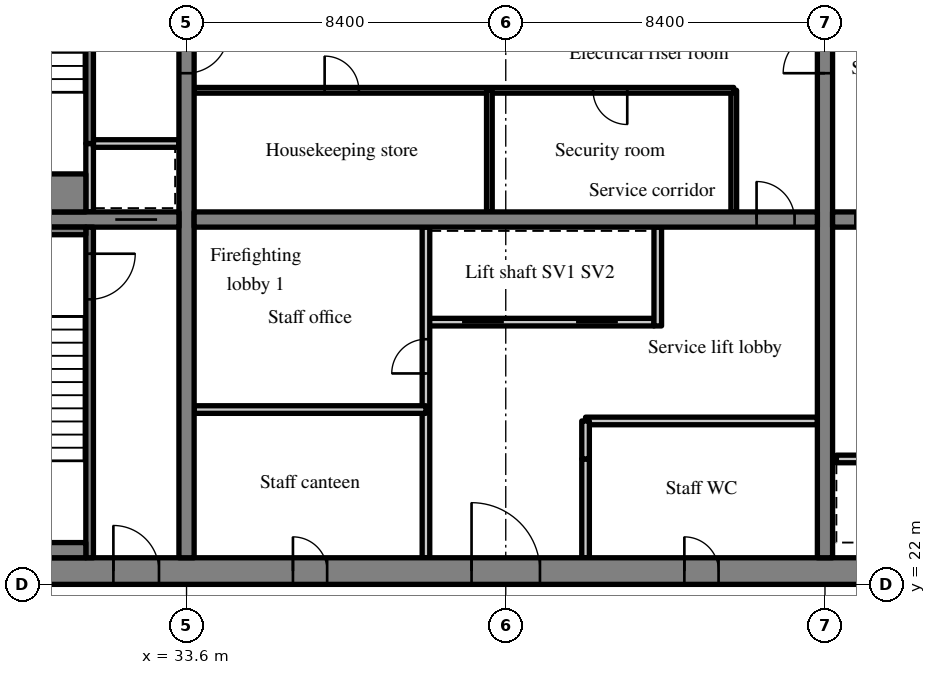
"""IFC4 building model, lengths in metres.
Left out: names, types, materials, properties, quantities, classifications, styles, units other than length and angle.
Written with IfcOpenShell. Run it as: python <this file> out.ifc"""

import sys

from ifc_helpers import new_model, si_unit, direction, frame, frame_2d, origin, place, context, subcontext, project, spatial, rectangle, extrude, source, transform, mapped, element, fill, save


model = new_model("IFC4")
c1 = context("Model", 3, precision=1e-05, world=origin(), true_north=direction((0.0, 1.0)))
c2 = subcontext(c1, "Body", "Model", "MODEL_VIEW")
j1 = project(units=[si_unit("LENGTHUNIT", "METRE"), si_unit("PLANEANGLEUNIT", "RADIAN")], contexts=[c1])
p1 = place(None, origin())
s1 = spatial("IfcSite", under=j1, at=p1, CompositionType="ELEMENT")
p2 = place(p1, origin())
s2 = spatial("IfcBuilding", under=s1, at=p2, CompositionType="ELEMENT")
p3 = place(p2, frame((0.0, 0.0, 174.4)))
s3 = spatial("IfcBuildingStorey", under=s2, at=p3, CompositionType="ELEMENT", Elevation=174.4)
m1 = source(origin(), c2, "Body", "SweptSolid", [
    extrude(rectangle(XDim=50.4, YDim=0.7, at=frame_2d((25.2, 0.0))), origin(), (0.0, 0.0, 1.0), 3.52),
])
p4 = place(p3, frame((25.2, 22.35, 0.0), z_axis=(0.0, 0.0, 1.0), x_axis=(1.0, 0.0, 0.0)))
e1 = element("IfcWall", 1, at=p4, inside=s3, PredefinedType="SHEAR", context=c2, shape_type="MappedRepresentation", body=[
    mapped(m1, transform((0.0, 0.0, 0.0), scale=1.0)),
])
m2 = source(origin(), c2, "Body", "SweptSolid", [
    extrude(rectangle(XDim=1.8, YDim=2.1, at=frame_2d((0.9, 1.05))), frame((0.0, 0.36, 0.0), z_axis=(0.0, -1.0, 0.0), x_axis=(1.0, 0.0, 0.0)), (0.0, 0.0, 1.0), 0.72),
])
p5 = place(p4, frame((15.9, 0.0, 0.0)))
e2 = element("IfcOpeningElement", 2, at=p5, cuts=e1, PredefinedType="OPENING", context=c2, shape_type="MappedRepresentation", body=[
    mapped(m2, transform((0.0, 0.0, 0.0), scale=1.0)),
])
m3 = source(origin(), c2, "Body", "SweptSolid", [
    extrude(rectangle(XDim=0.9, YDim=2.1, at=frame_2d((0.45, 1.05))), frame((0.0, 0.36, 0.0), z_axis=(0.0, -1.0, 0.0), x_axis=(1.0, 0.0, 0.0)), (0.0, 0.0, 1.0), 0.72),
])
p6 = place(p4, frame((11.2, 0.0, 0.0)))
e3 = element("IfcOpeningElement", 3, at=p6, cuts=e1, PredefinedType="OPENING", context=c2, shape_type="MappedRepresentation", body=[
    mapped(m3, transform((0.0, 0.0, 0.0), scale=1.0)),
])
p7 = place(p4, frame((21.5, 0.0, 0.0)))
e4 = element("IfcOpeningElement", 4, at=p7, cuts=e1, PredefinedType="OPENING", context=c2, shape_type="MappedRepresentation", body=[
    mapped(m3, transform((0.0, 0.0, 0.0), scale=1.0)),
])
p8 = place(p4, frame((32.7, 0.0, 0.0)))
e5 = element("IfcOpeningElement", 5, at=p8, cuts=e1, PredefinedType="OPENING", context=c2, shape_type="MappedRepresentation", body=[
    mapped(m2, transform((0.0, 0.0, 0.0), scale=1.0)),
])
m4 = source(origin(), c2, "Body", "SweptSolid", [
    extrude(rectangle(XDim=1.2, YDim=2.1, at=frame_2d((0.6, 1.05))), frame((0.0, 0.36, 0.0), z_axis=(0.0, -1.0, 0.0), x_axis=(1.0, 0.0, 0.0)), (0.0, 0.0, 1.0), 0.72),
])
p9 = place(p4, frame((6.475, 0.0, 0.0)))
e6 = element("IfcOpeningElement", 6, at=p9, cuts=e1, PredefinedType="OPENING", context=c2, shape_type="MappedRepresentation", body=[
    mapped(m4, transform((0.0, 0.0, 0.0), scale=1.0)),
])
p10 = place(p4, frame((47.875, 0.0, 0.0)))
e7 = element("IfcOpeningElement", 7, at=p10, cuts=e1, PredefinedType="OPENING", context=c2, shape_type="MappedRepresentation", body=[
    mapped(m4, transform((0.0, 0.0, 0.0), scale=1.0)),
])
m5 = source(origin(), c2, "Body", "SweptSolid", [
    extrude(rectangle(XDim=18.6, YDim=0.4, at=frame_2d((9.3, 0.0))), origin(), (0.0, 0.0, 1.0), 3.52),
])
p11 = place(p3, frame((33.6, 22.7, 0.0), z_axis=(0.0, 0.0, 1.0), x_axis=(0.0, 1.0, 0.0)))
e8 = element("IfcWall", 8, at=p11, inside=s3, PredefinedType="SHEAR", context=c2, shape_type="MappedRepresentation", body=[
    mapped(m5, transform((0.0, 0.0, 0.0), scale=1.0)),
])
m6 = source(origin(), c2, "Body", "SweptSolid", [
    extrude(rectangle(XDim=1.1, YDim=2.1, at=frame_2d((0.55, 1.05))), frame((0.0, 0.21, 0.0), z_axis=(0.0, -1.0, 0.0), x_axis=(1.0, 0.0, 0.0)), (0.0, 0.0, 1.0), 0.42),
])
p12 = place(p11, frame((12.75, 0.0, 0.0)))
e9 = element("IfcOpeningElement", 9, at=p12, cuts=e8, PredefinedType="OPENING", context=c2, shape_type="MappedRepresentation", body=[
    mapped(m6, transform((0.0, 0.0, 0.0), scale=1.0)),
])
p13 = place(p3, frame((50.4, 22.7, 0.0), z_axis=(0.0, 0.0, 1.0), x_axis=(0.0, 1.0, 0.0)))
e10 = element("IfcWall", 10, at=p13, inside=s3, PredefinedType="SHEAR", context=c2, shape_type="MappedRepresentation", body=[
    mapped(m5, transform((0.0, 0.0, 0.0), scale=1.0)),
])
p14 = place(p13, frame((12.75, 0.0, 0.0)))
e11 = element("IfcOpeningElement", 11, at=p14, cuts=e10, PredefinedType="OPENING", context=c2, shape_type="MappedRepresentation", body=[
    mapped(m6, transform((0.0, 0.0, 0.0), scale=1.0)),
])
m7 = source(origin(), c2, "Body", "SweptSolid", [
    extrude(rectangle(XDim=7.5, YDim=0.4, at=frame_2d((3.75, 0.0))), origin(), (0.0, 0.0, 1.0), 3.52),
])
p15 = place(p3, frame((25.9, 31.6, 0.0), z_axis=(0.0, 0.0, 1.0), x_axis=(1.0, 0.0, 0.0)))
e12 = element("IfcWall", 12, at=p15, inside=s3, PredefinedType="SHEAR", context=c2, shape_type="MappedRepresentation", body=[
    mapped(m7, transform((0.0, 0.0, 0.0), scale=1.0)),
])
p16 = place(p15, frame((5.825, 0.0, 0.0)))
e13 = element("IfcOpeningElement", 13, at=p16, cuts=e12, PredefinedType="OPENING", context=c2, shape_type="MappedRepresentation", body=[
    mapped(m6, transform((0.0, 0.0, 0.0), scale=1.0)),
])
m8 = source(origin(), c2, "Body", "SweptSolid", [
    extrude(rectangle(XDim=16.4, YDim=0.4, at=frame_2d((8.2, 0.0))), origin(), (0.0, 0.0, 1.0), 3.52),
])
p17 = place(p3, frame((33.8, 31.6, 0.0), z_axis=(0.0, 0.0, 1.0), x_axis=(1.0, 0.0, 0.0)))
e14 = element("IfcWall", 14, at=p17, inside=s3, PredefinedType="SHEAR", context=c2, shape_type="MappedRepresentation", body=[
    mapped(m8, transform((0.0, 0.0, 0.0), scale=1.0)),
])
m9 = source(origin(), c2, "Body", "SweptSolid", [
    extrude(rectangle(XDim=1.0, YDim=2.1, at=frame_2d((0.5, 1.05))), frame((0.0, 0.21, 0.0), z_axis=(0.0, -1.0, 0.0), x_axis=(1.0, 0.0, 0.0)), (0.0, 0.0, 1.0), 0.42),
])
p18 = place(p17, frame((14.8, 0.0, 0.0)))
e15 = element("IfcOpeningElement", 15, at=p18, cuts=e14, PredefinedType="OPENING", context=c2, shape_type="MappedRepresentation", body=[
    mapped(m9, transform((0.0, 0.0, 0.0), scale=1.0)),
])
p19 = place(p3, frame((50.6, 31.6, 0.0), z_axis=(0.0, 0.0, 1.0), x_axis=(1.0, 0.0, 0.0)))
e16 = element("IfcWall", 16, at=p19, inside=s3, PredefinedType="SHEAR", context=c2, shape_type="MappedRepresentation", body=[
    mapped(m8, transform((0.0, 0.0, 0.0), scale=1.0)),
])
p20 = place(p19, frame((0.6, 0.0, 0.0)))
e17 = element("IfcOpeningElement", 17, at=p20, cuts=e16, PredefinedType="OPENING", context=c2, shape_type="MappedRepresentation", body=[
    mapped(m9, transform((0.0, 0.0, 0.0), scale=1.0)),
])
m10 = source(origin(), c2, "Body", "SweptSolid", [
    extrude(rectangle(XDim=6.0, YDim=0.2, at=frame_2d((3.0, 0.0))), origin(), (0.0, 0.0, 1.0), 3.52),
])
p21 = place(p3, frame((39.9, 28.9, 0.0), z_axis=(0.0, 0.0, 1.0), x_axis=(1.0, 0.0, 0.0)))
e18 = element("IfcWall", 18, at=p21, inside=s3, PredefinedType="SOLIDWALL", context=c2, shape_type="MappedRepresentation", body=[
    mapped(m10, transform((0.0, 0.0, 0.0), scale=1.0)),
])
m11 = source(origin(), c2, "Body", "SweptSolid", [
    extrude(rectangle(XDim=1.1, YDim=2.1, at=frame_2d((0.55, 1.05))), frame((0.0, 0.11, 0.0), z_axis=(0.0, -1.0, 0.0), x_axis=(1.0, 0.0, 0.0)), (0.0, 0.0, 1.0), 0.22),
])
p22 = place(p21, frame((0.95, 0.0, 0.0)))
e19 = element("IfcOpeningElement", 19, at=p22, cuts=e18, PredefinedType="OPENING", context=c2, shape_type="MappedRepresentation", body=[
    mapped(m11, transform((0.0, 0.0, 0.0), scale=1.0)),
])
p23 = place(p21, frame((3.95, 0.0, 0.0)))
e20 = element("IfcOpeningElement", 20, at=p23, cuts=e18, PredefinedType="OPENING", context=c2, shape_type="MappedRepresentation", body=[
    mapped(m11, transform((0.0, 0.0, 0.0), scale=1.0)),
])
m12 = source(origin(), c2, "Body", "SweptSolid", [
    extrude(rectangle(XDim=8.7, YDim=0.2, at=frame_2d((4.35, 0.0))), origin(), (0.0, 0.0, 1.0), 3.52),
])
p24 = place(p3, frame((39.9, 22.7, 0.0), z_axis=(0.0, 0.0, 1.0), x_axis=(0.0, 1.0, 0.0)))
e21 = element("IfcWall", 21, at=p24, inside=s3, PredefinedType="PARTITIONING", context=c2, shape_type="MappedRepresentation", body=[
    mapped(m12, transform((0.0, 0.0, 0.0), scale=1.0)),
])
m13 = source(origin(), c2, "Body", "SweptSolid", [
    extrude(rectangle(XDim=0.9, YDim=2.1, at=frame_2d((0.45, 1.05))), frame((0.0, 0.11, 0.0), z_axis=(0.0, -1.0, 0.0), x_axis=(1.0, 0.0, 0.0)), (0.0, 0.0, 1.0), 0.22),
])
p25 = place(p24, frame((4.85, 0.0, 0.0)))
e22 = element("IfcOpeningElement", 22, at=p25, cuts=e21, PredefinedType="OPENING", context=c2, shape_type="MappedRepresentation", body=[
    mapped(m13, transform((0.0, 0.0, 0.0), scale=1.0)),
])
m14 = source(origin(), c2, "Body", "SweptSolid", [
    extrude(rectangle(XDim=2.6, YDim=0.2, at=frame_2d((1.3, 0.0))), origin(), (0.0, 0.0, 1.0), 3.52),
])
p26 = place(p3, frame((44.1, 22.7, 0.0), z_axis=(0.0, 0.0, 1.0), x_axis=(0.0, 1.0, 0.0)))
e23 = element("IfcWall", 23, at=p26, inside=s3, PredefinedType="PARTITIONING", context=c2, shape_type="MappedRepresentation", body=[
    mapped(m14, transform((0.0, 0.0, 0.0), scale=1.0)),
])
m15 = source(origin(), c2, "Body", "SweptSolid", [
    extrude(rectangle(XDim=2.6, YDim=0.2, at=frame_2d((1.3, 0.0))), origin(), (0.0, 0.0, 1.0), 3.52),
])
p27 = place(p3, frame((46.0, 28.8, 0.0), z_axis=(0.0, 0.0, 1.0), x_axis=(0.0, 1.0, 0.0)))
e24 = element("IfcWall", 24, at=p27, inside=s3, PredefinedType="SOLIDWALL", context=c2, shape_type="MappedRepresentation", body=[
    mapped(m15, transform((0.0, 0.0, 0.0), scale=1.0)),
])
m16 = source(origin(), c2, "Body", "SweptSolid", [
    extrude(rectangle(XDim=6.1, YDim=0.2, at=frame_2d((3.05, 0.0))), origin(), (0.0, 0.0, 1.0), 3.52),
])
for number, where, z_axis, x_axis in (
    (25, (33.8, 26.6, 0.0), (0.0, 0.0, 1.0), (1.0, 0.0, 0.0)),
    (26, (44.1, 26.3, 0.0), (0.0, 0.0, 1.0), (1.0, 0.0, 0.0)),
):
    element("IfcWall", number, at=place(p3, frame(where, z_axis=z_axis, x_axis=x_axis)), inside=s3, PredefinedType="PARTITIONING", context=c2, shape_type="MappedRepresentation", body=[
        mapped(m16, transform((0.0, 0.0, 0.0), scale=1.0)),
    ])
m17 = source(origin(), c2, "Body", "SweptSolid", [
    extrude(rectangle(XDim=1.0, YDim=0.2, at=frame_2d((0.5, 0.0))), origin(), (0.0, 0.0, 1.0), 3.52),
])
p28 = place(p3, frame((44.1, 25.3, 0.0), z_axis=(0.0, 0.0, 1.0), x_axis=(0.0, 1.0, 0.0)))
e27 = element("IfcWall", 27, at=p28, inside=s3, PredefinedType="PARTITIONING", context=c2, shape_type="MappedRepresentation", body=[
    mapped(m17, transform((0.0, 0.0, 0.0), scale=1.0)),
])
m18 = source(origin(), c2, "Body", "SweptSolid", [
    extrude(rectangle(XDim=3.2, YDim=0.15, at=frame_2d((1.6, 0.0))), origin(), (0.0, 0.0, 1.0), 3.52),
])
p29 = place(p3, frame((48.0, 31.8, 0.0), z_axis=(0.0, 0.0, 1.0), x_axis=(0.0, 1.0, 0.0)))
e28 = element("IfcWall", 28, at=p29, inside=s3, PredefinedType="PARTITIONING", context=c2, shape_type="MappedRepresentation", body=[
    mapped(m18, transform((0.0, 0.0, 0.0), scale=1.0)),
])
m19 = source(origin(), c2, "Body", "SweptSolid", [
    extrude(rectangle(XDim=14.2, YDim=0.15, at=frame_2d((7.1, 0.0))), origin(), (0.0, 0.0, 1.0), 3.52),
])
p30 = place(p3, frame((33.8, 35.0, 0.0), z_axis=(0.0, 0.0, 1.0), x_axis=(1.0, 0.0, 0.0)))
e29 = element("IfcWall", 29, at=p30, inside=s3, PredefinedType="PARTITIONING", context=c2, shape_type="MappedRepresentation", body=[
    mapped(m19, transform((0.0, 0.0, 0.0), scale=1.0)),
])
m20 = source(origin(), c2, "Body", "SweptSolid", [
    extrude(rectangle(XDim=0.9, YDim=2.1, at=frame_2d((0.45, 1.05))), frame((0.0, 0.085, 0.0), z_axis=(0.0, -1.0, 0.0), x_axis=(1.0, 0.0, 0.0)), (0.0, 0.0, 1.0), 0.17),
])
p31 = place(p30, frame((3.434, 0.0, 0.0)))
e30 = element("IfcOpeningElement", 30, at=p31, cuts=e29, PredefinedType="OPENING", context=c2, shape_type="MappedRepresentation", body=[
    mapped(m20, transform((0.0, 0.0, 0.0), scale=1.0)),
])
p32 = place(p30, frame((10.497, 0.0, 0.0)))
e31 = element("IfcOpeningElement", 31, at=p32, cuts=e29, PredefinedType="OPENING", context=c2, shape_type="MappedRepresentation", body=[
    mapped(m20, transform((0.0, 0.0, 0.0), scale=1.0)),
])
p33 = place(p3, frame((41.569, 31.8, 0.0), z_axis=(0.0, 0.0, 1.0), x_axis=(0.0, 1.0, 0.0)))
e32 = element("IfcWall", 32, at=p33, inside=s3, PredefinedType="PARTITIONING", context=c2, shape_type="MappedRepresentation", body=[
    mapped(m18, transform((0.0, 0.0, 0.0), scale=1.0)),
])
p34 = place(p3, frame((56.7, 25.3, 0.0), z_axis=(0.0, 0.0, 1.0), x_axis=(-1.0, 0.0, 0.0)))
e33 = element("IfcWall", 33, at=p34, inside=s3, PredefinedType="SOLIDWALL", context=c2, shape_type="MappedRepresentation", body=[
    mapped(m10, transform((0.0, 0.0, 0.0), scale=1.0)),
])
p35 = place(p34, frame((0.95, 0.0, 0.0)))
e34 = element("IfcOpeningElement", 34, at=p35, cuts=e33, PredefinedType="OPENING", context=c2, shape_type="MappedRepresentation", body=[
    mapped(m11, transform((0.0, 0.0, 0.0), scale=1.0)),
])
p36 = place(p34, frame((3.95, 0.0, 0.0)))
e35 = element("IfcOpeningElement", 35, at=p36, cuts=e33, PredefinedType="OPENING", context=c2, shape_type="MappedRepresentation", body=[
    mapped(m11, transform((0.0, 0.0, 0.0), scale=1.0)),
])
m21 = source(origin(), c2, "Body", "SweptSolid", [
    extrude(rectangle(XDim=8.7, YDim=0.2, at=frame_2d((4.35, 0.0))), origin(), (0.0, 0.0, 1.0), 3.52),
])
p37 = place(p3, frame((31.05, 22.7, 0.0), z_axis=(0.0, 0.0, 1.0), x_axis=(0.0, 1.0, 0.0)))
e36 = element("IfcWall", 36, at=p37, inside=s3, PredefinedType="SOLIDWALL", context=c2, shape_type="MappedRepresentation", body=[
    mapped(m21, transform((0.0, 0.0, 0.0), scale=1.0)),
])
m22 = source(origin(), c2, "Body", "SweptSolid", [
    extrude(rectangle(XDim=1.2, YDim=2.1, at=frame_2d((0.6, 1.05))), frame((0.0, 0.11, 0.0), z_axis=(0.0, -1.0, 0.0), x_axis=(1.0, 0.0, 0.0)), (0.0, 0.0, 1.0), 0.22),
])
p38 = place(p37, frame((6.8, 0.0, 0.0)))
e37 = element("IfcOpeningElement", 37, at=p38, cuts=e36, PredefinedType="OPENING", context=c2, shape_type="MappedRepresentation", body=[
    mapped(m22, transform((0.0, 0.0, 0.0), scale=1.0)),
])
m23 = source(origin(), c2, "Body", "SweptSolid", [
    extrude(rectangle(XDim=1.8, YDim=0.2, at=frame_2d((0.9, 0.0))), origin(), (0.0, 0.0, 1.0), 3.52),
])
p39 = place(p3, frame((31.05, 31.8, 0.0), z_axis=(0.0, 0.0, 1.0), x_axis=(0.0, 1.0, 0.0)))
e38 = element("IfcWall", 38, at=p39, inside=s3, PredefinedType="SOLIDWALL", context=c2, shape_type="MappedRepresentation", body=[
    mapped(m23, transform((0.0, 0.0, 0.0), scale=1.0)),
])
m24 = source(origin(), c2, "Body", "SweptSolid", [
    extrude(rectangle(XDim=2.25, YDim=0.2, at=frame_2d((1.125, 0.0))), origin(), (0.0, 0.0, 1.0), 3.52),
])
p40 = place(p3, frame((31.15, 33.6, 0.0), z_axis=(0.0, 0.0, 1.0), x_axis=(1.0, 0.0, 0.0)))
e39 = element("IfcWall", 39, at=p40, inside=s3, PredefinedType="SOLIDWALL", context=c2, shape_type="MappedRepresentation", body=[
    mapped(m24, transform((0.0, 0.0, 0.0), scale=1.0)),
])
m25 = source(origin(), c2, "Body", "SweptSolid", [
    extrude(rectangle(XDim=7.7, YDim=0.2, at=frame_2d((3.85, 0.0))), origin(), (0.0, 0.0, 1.0), 3.52),
])
p41 = place(p3, frame((31.05, 33.6, 0.0), z_axis=(0.0, 0.0, 1.0), x_axis=(0.0, 1.0, 0.0)))
e40 = element("IfcWall", 40, at=p41, inside=s3, PredefinedType="SOLIDWALL", context=c2, shape_type="MappedRepresentation", body=[
    mapped(m25, transform((0.0, 0.0, 0.0), scale=1.0)),
])
m26 = source(origin(), c2, "Body", "SweptSolid", [
    extrude(rectangle(XDim=1.8, YDim=2.1, at=frame_2d((0.9, 1.05))), frame((0.0, 0.11, 0.0), z_axis=(0.0, -1.0, 0.0), x_axis=(1.0, 0.0, 0.0)), (0.0, 0.0, 1.0), 0.22),
])
p42 = place(p41, frame((5.3, 0.0, 0.0)))
e41 = element("IfcOpeningElement", 41, at=p42, cuts=e40, PredefinedType="OPENING", context=c2, shape_type="MappedRepresentation", body=[
    mapped(m26, transform((0.0, 0.0, 0.0), scale=1.0)),
])
m27 = source(origin(), c2, "Body", "SweptSolid", [
    extrude(rectangle(XDim=5.05, YDim=0.4, at=frame_2d((2.525, 0.0))), origin(), (0.0, 0.0, 1.0), 3.52),
])
p43 = place(p3, frame((25.9, 22.9, 0.0), z_axis=(0.0, 0.0, 1.0), x_axis=(1.0, 0.0, 0.0)))
e42 = element("IfcWall", 42, at=p43, inside=s3, PredefinedType="SOLIDWALL", context=c2, shape_type="MappedRepresentation", body=[
    mapped(m27, transform((0.0, 0.0, 0.0), scale=1.0)),
])
m28 = source(origin(), c2, "Body", "SweptSolid", [
    extrude(rectangle(XDim=5.05, YDim=0.2, at=frame_2d((2.525, 0.0))), origin(), (0.0, 0.0, 1.0), 3.52),
])
p44 = place(p3, frame((25.9, 31.3, 0.0), z_axis=(0.0, 0.0, 1.0), x_axis=(1.0, 0.0, 0.0)))
e43 = element("IfcWall", 43, at=p44, inside=s3, PredefinedType="SOLIDWALL", context=c2, shape_type="MappedRepresentation", body=[
    mapped(m28, transform((0.0, 0.0, 0.0), scale=1.0)),
])
m29 = source(origin(), c2, "Body", "SweptSolid", [
    extrude(rectangle(XDim=5.05, YDim=1.0, at=frame_2d((2.525, 0.0))), origin(), (0.0, 0.0, 1.0), 3.52),
])
p45 = place(p3, frame((25.9, 32.3, 0.0), z_axis=(0.0, 0.0, 1.0), x_axis=(1.0, 0.0, 0.0)))
e44 = element("IfcWall", 44, at=p45, inside=s3, PredefinedType="SOLIDWALL", context=c2, shape_type="MappedRepresentation", body=[
    mapped(m29, transform((0.0, 0.0, 0.0), scale=1.0)),
])
m30 = source(origin(), c2, "Body", "SweptSolid", [
    extrude(rectangle(XDim=1.8, YDim=2.1, at=frame_2d((0.9, 1.05))), frame((0.0, 0.275, 0.0), z_axis=(0.0, -1.0, 0.0), x_axis=(1.0, 0.0, 0.0)), (0.0, 0.0, 1.0), 0.05),
])
p46 = place(p5, origin())
e45 = element("IfcDoor", 45, at=p46, inside=s3, OperationType="DOUBLE_DOOR_SINGLE_SWING", PredefinedType="DOOR", context=c2, shape_type="MappedRepresentation", body=[
    mapped(m30, transform((0.0, 0.0, 0.0), scale=1.0)),
])
fill(e2, e45)
m31 = source(origin(), c2, "Body", "SweptSolid", [
    extrude(rectangle(XDim=1.0, YDim=2.1, at=frame_2d((0.5, 1.05))), frame((0.0, 0.025, 0.0), z_axis=(0.0, -1.0, 0.0), x_axis=(1.0, 0.0, 0.0)), (0.0, 0.0, 1.0), 0.05),
])
p47 = place(p18, origin())
e46 = element("IfcDoor", 46, at=p47, inside=s3, OperationType="SINGLE_SWING_LEFT", PredefinedType="DOOR", context=c2, shape_type="MappedRepresentation", body=[
    mapped(m31, transform((0.0, 0.0, 0.0), scale=1.0)),
])
fill(e15, e46)
m32 = source(origin(), c2, "Body", "SweptSolid", [
    extrude(rectangle(XDim=1.1, YDim=2.1, at=frame_2d((0.55, 1.05))), frame((0.0, 0.025, 0.0), z_axis=(0.0, -1.0, 0.0), x_axis=(1.0, 0.0, 0.0)), (0.0, 0.0, 1.0), 0.05),
])
p48 = place(p22, origin())
e47 = element("IfcDoor", 47, at=p48, inside=s3, OperationType="SLIDING_TO_LEFT", PredefinedType="DOOR", context=c2, shape_type="MappedRepresentation", body=[
    mapped(m32, transform((0.0, 0.0, 0.0), scale=1.0)),
])
fill(e19, e47)
p49 = place(p23, origin())
e48 = element("IfcDoor", 48, at=p49, inside=s3, OperationType="SLIDING_TO_RIGHT", PredefinedType="DOOR", context=c2, shape_type="MappedRepresentation", body=[
    mapped(m32, transform((0.0, 0.0, 0.0), scale=1.0)),
])
fill(e20, e48)
m33 = source(origin(), c2, "Body", "SweptSolid", [
    extrude(rectangle(XDim=0.9, YDim=2.1, at=frame_2d((0.45, 1.05))), frame((0.0, 0.275, 0.0), z_axis=(0.0, -1.0, 0.0), x_axis=(1.0, 0.0, 0.0)), (0.0, 0.0, 1.0), 0.05),
])
p50 = place(p6, origin())
e49 = element("IfcDoor", 49, at=p50, inside=s3, OperationType="SINGLE_SWING_LEFT", PredefinedType="DOOR", context=c2, shape_type="MappedRepresentation", body=[
    mapped(m33, transform((0.0, 0.0, 0.0), scale=1.0)),
])
fill(e3, e49)
m34 = source(origin(), c2, "Body", "SweptSolid", [
    extrude(rectangle(XDim=0.9, YDim=2.1, at=frame_2d((0.45, 1.05))), frame((0.0, 0.025, 0.0), z_axis=(0.0, -1.0, 0.0), x_axis=(1.0, 0.0, 0.0)), (0.0, 0.0, 1.0), 0.05),
])
p51 = place(p25, origin())
e50 = element("IfcDoor", 50, at=p51, inside=s3, OperationType="SINGLE_SWING_LEFT", PredefinedType="DOOR", context=c2, shape_type="MappedRepresentation", body=[
    mapped(m34, transform((0.0, 0.0, 0.0), scale=1.0)),
])
fill(e22, e50)
p52 = place(p7, origin())
e51 = element("IfcDoor", 51, at=p52, inside=s3, OperationType="SINGLE_SWING_LEFT", PredefinedType="DOOR", context=c2, shape_type="MappedRepresentation", body=[
    mapped(m33, transform((0.0, 0.0, 0.0), scale=1.0)),
])
fill(e4, e51)
p53 = place(p31, origin())
e52 = element("IfcDoor", 52, at=p53, inside=s3, OperationType="SINGLE_SWING_LEFT", PredefinedType="DOOR", context=c2, shape_type="MappedRepresentation", body=[
    mapped(m34, transform((0.0, 0.0, 0.0), scale=1.0)),
])
fill(e30, e52)
p54 = place(p32, origin())
e53 = element("IfcDoor", 53, at=p54, inside=s3, OperationType="SINGLE_SWING_RIGHT", PredefinedType="DOOR", context=c2, shape_type="MappedRepresentation", body=[
    mapped(m34, transform((0.0, 0.0, 0.0), scale=1.0)),
])
fill(e31, e53)
m35 = source(origin(), c2, "Body", "SweptSolid", [
    extrude(rectangle(XDim=1.2, YDim=2.1, at=frame_2d((0.6, 1.05))), frame((0.0, 0.025, 0.0), z_axis=(0.0, -1.0, 0.0), x_axis=(1.0, 0.0, 0.0)), (0.0, 0.0, 1.0), 0.05),
])
p55 = place(p38, origin())
e54 = element("IfcDoor", 54, at=p55, inside=s3, OperationType="SINGLE_SWING_RIGHT", PredefinedType="DOOR", context=c2, shape_type="MappedRepresentation", body=[
    mapped(m35, transform((0.0, 0.0, 0.0), scale=1.0)),
])
fill(e37, e54)
m36 = source(origin(), c2, "Body", "SweptSolid", [
    extrude(rectangle(XDim=1.2, YDim=2.1, at=frame_2d((0.6, 1.05))), frame((0.0, 0.275, 0.0), z_axis=(0.0, -1.0, 0.0), x_axis=(1.0, 0.0, 0.0)), (0.0, 0.0, 1.0), 0.05),
])
p56 = place(p9, origin())
e55 = element("IfcDoor", 55, at=p56, inside=s3, OperationType="SINGLE_SWING_LEFT", PredefinedType="DOOR", context=c2, shape_type="MappedRepresentation", body=[
    mapped(m36, transform((0.0, 0.0, 0.0), scale=1.0)),
])
fill(e6, e55)
p57 = place(p16, origin())
e56 = element("IfcDoor", 56, at=p57, inside=s3, OperationType="SLIDING_TO_LEFT", PredefinedType="DOOR", context=c2, shape_type="MappedRepresentation", body=[
    mapped(m32, transform((0.0, 0.0, 0.0), scale=1.0)),
])
fill(e13, e56)
p58 = place(p12, origin())
e57 = element("IfcDoor", 57, at=p58, inside=s3, OperationType="SINGLE_SWING_RIGHT", PredefinedType="DOOR", context=c2, shape_type="MappedRepresentation", body=[
    mapped(m32, transform((0.0, 0.0, 0.0), scale=1.0)),
])
fill(e9, e57)
p59 = place(p14, origin())
e58 = element("IfcDoor", 58, at=p59, inside=s3, OperationType="SINGLE_SWING_LEFT", PredefinedType="DOOR", context=c2, shape_type="MappedRepresentation", body=[
    mapped(m32, transform((0.0, 0.0, 0.0), scale=1.0)),
])
fill(e11, e58)
save(model, sys.argv[1])
